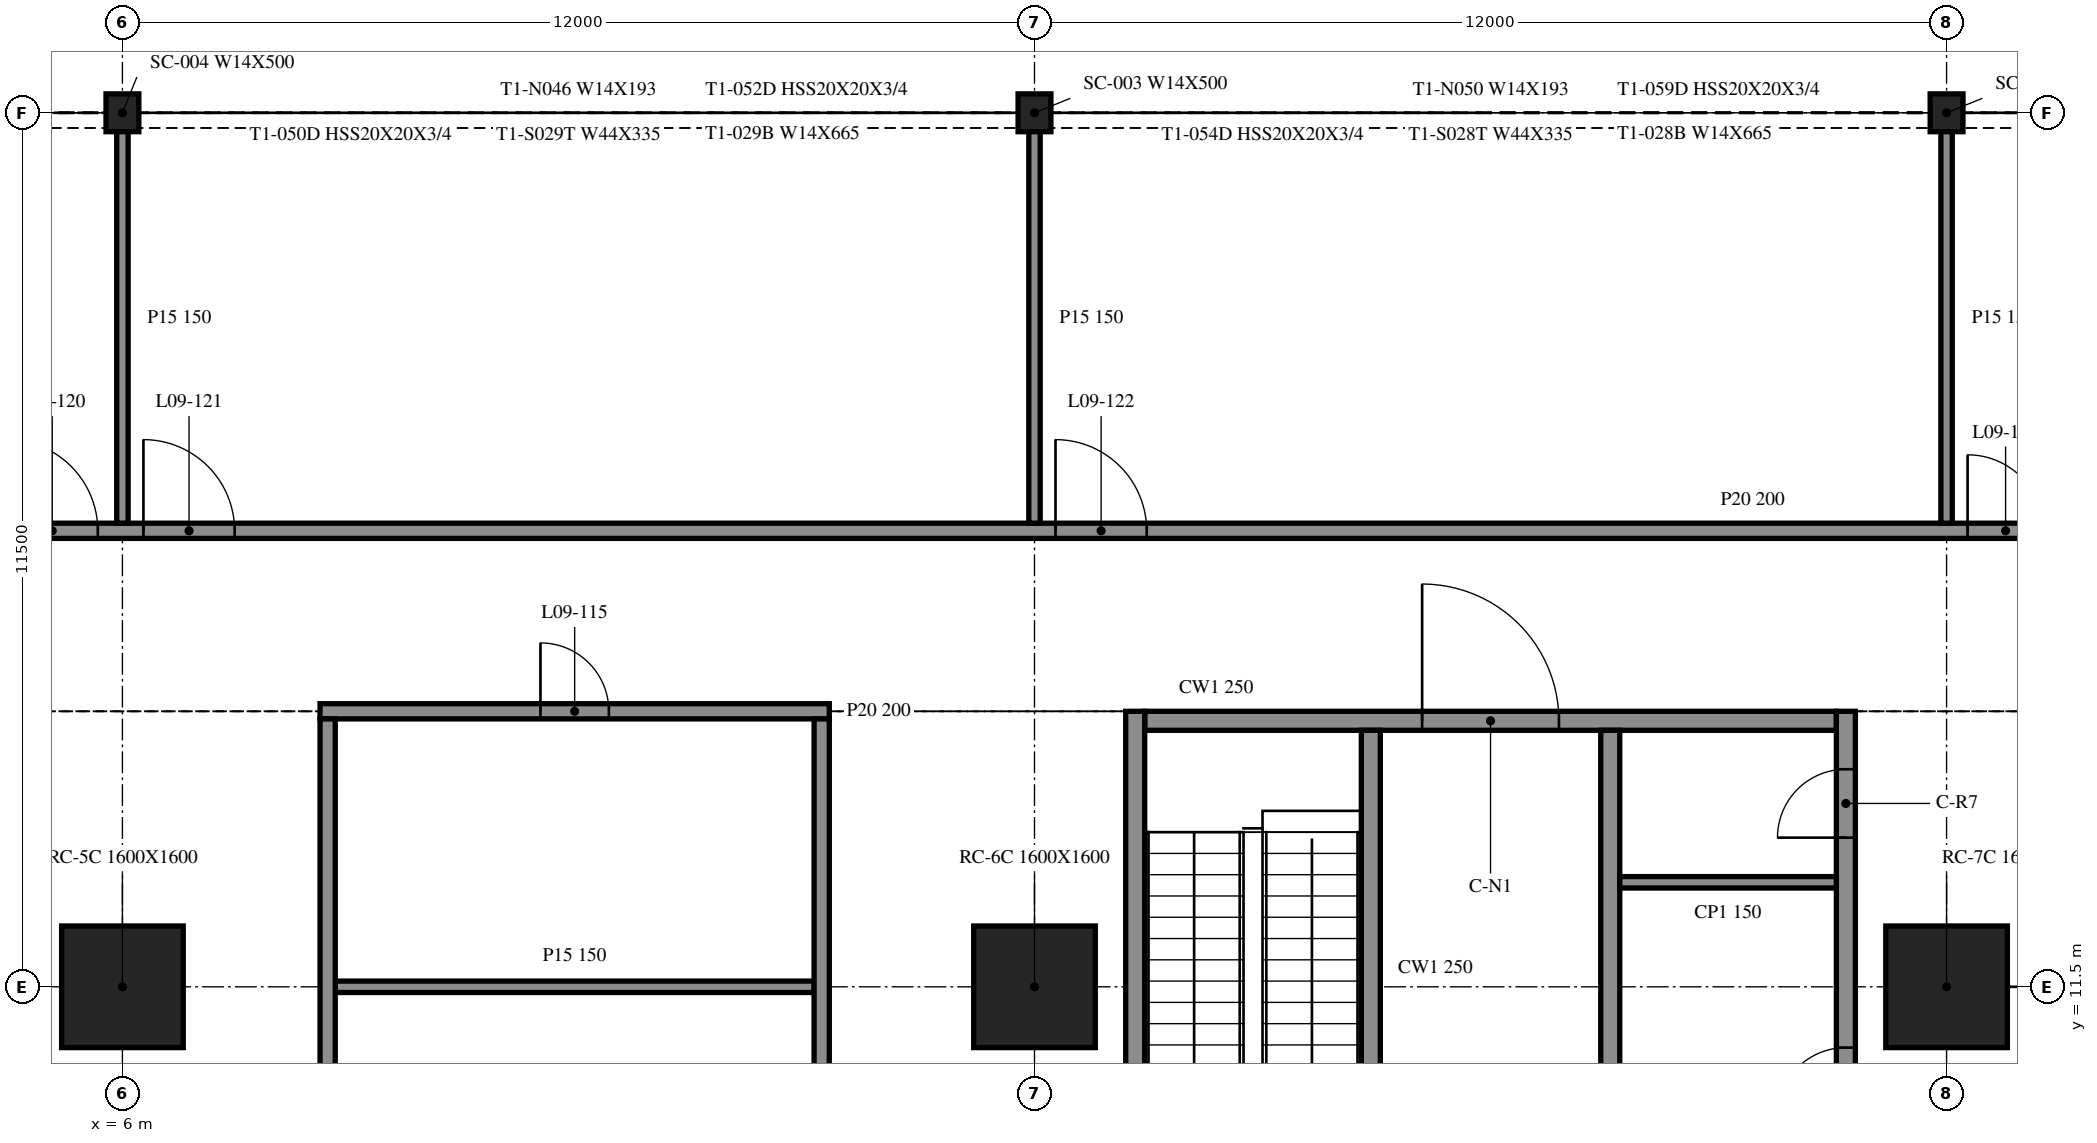
"""IFC4 building model, lengths in metres.
Left out: names, types, materials, properties, quantities, classifications, styles, units other than length and angle.
Written with IfcOpenShell. Run it as: python <this file> out.ifc"""

import sys

from ifc_helpers import new_model, si_unit, direction, frame, frame_2d, origin, origin_2d, place, context, subcontext, project, spatial, rectangle, i_section, extrude, element, fill, save


model = new_model("IFC4")
c1 = context("Model", 3, precision=1e-05, world=origin(), true_north=direction((0.0, 1.0)))
c2 = subcontext(c1, "Body", "Model", "MODEL_VIEW")
j1 = project(units=[si_unit("LENGTHUNIT", "METRE"), si_unit("PLANEANGLEUNIT", "RADIAN")], contexts=[c1])
p1 = place(None, origin())
s1 = spatial("IfcSite", under=j1, at=p1, CompositionType="ELEMENT")
p2 = place(p1, origin())
s2 = spatial("IfcBuilding", under=s1, at=p2, CompositionType="ELEMENT")
p3 = place(p2, frame((0.0, 0.0, 41.6)))
s3 = spatial("IfcBuildingStorey", under=s2, at=p3, CompositionType="ELEMENT", Elevation=41.6)
for number, where, z_axis, x_axis in (
    (1, (6.0, 11.5, -0.55), (0.0, 0.0, 1.0), (1.0, 0.0, 0.0)),
    (2, (18.0, 11.5, -0.55), (0.0, 0.0, 1.0), (1.0, 0.0, 0.0)),
    (3, (30.0, 11.5, -0.55), (0.0, 0.0, 1.0), (1.0, 0.0, 0.0)),
):
    element("IfcColumn", number, at=place(p3, frame(where, z_axis=z_axis, x_axis=x_axis)), inside=s3, PredefinedType="COLUMN", context=c2, shape_type="SweptSolid", body=[
        extrude(rectangle(XDim=1.6, YDim=1.6, at=origin_2d()), origin(), (0.0, 0.0, 1.0), 4.61),
    ])
for number, where, z_axis, x_axis in (
    (4, (30.0, 23.0, -0.55), (0.0, 0.0, 1.0), (1.0, 0.0, 0.0)),
    (5, (18.0, 23.0, -0.55), (0.0, 0.0, 1.0), (1.0, 0.0, 0.0)),
    (6, (6.0, 23.0, -0.55), (0.0, 0.0, 1.0), (1.0, 0.0, 0.0)),
):
    element("IfcColumn", number, at=place(p3, frame(where, z_axis=z_axis, x_axis=x_axis)), inside=s3, PredefinedType="COLUMN", context=c2, shape_type="SweptSolid", body=[
        extrude(i_section(OverallWidth=0.432, OverallDepth=0.498, WebThickness=0.056, FlangeThickness=0.089, at=origin_2d()), origin(), (0.0, 0.0, 1.0), 4.61),
    ])
p4 = place(p3, frame((19.325, 15.125, 0.0), z_axis=(0.0, 0.0, 1.0), x_axis=(0.0, -1.0, 0.0)))
e7 = element("IfcWall", 7, at=p4, inside=s3, PredefinedType="SOLIDWALL", context=c2, shape_type="SweptSolid", body=[
    extrude(rectangle(XDim=24.25, YDim=0.25, at=frame_2d((12.125, 0.0))), origin(), (0.0, 0.0, 1.0), 4.06),
])
p5 = place(p3, frame((28.675, -9.125, 0.0), z_axis=(0.0, 0.0, 1.0), x_axis=(0.0, 1.0, 0.0)))
e8 = element("IfcWall", 8, at=p5, inside=s3, PredefinedType="SOLIDWALL", context=c2, shape_type="SweptSolid", body=[
    extrude(rectangle(XDim=24.25, YDim=0.25, at=frame_2d((12.125, 0.0))), origin(), (0.0, 0.0, 1.0), 4.06),
])
p6 = place(p5, frame((13.075, 0.0, 0.0)))
e9 = element("IfcOpeningElement", 9, at=p6, cuts=e8, PredefinedType="OPENING", context=c2, shape_type="SweptSolid", body=[
    extrude(rectangle(XDim=0.9, YDim=2.1, at=frame_2d((0.45, 1.05))), frame((0.0, 0.135, 0.0), z_axis=(0.0, -1.0, 0.0), x_axis=(1.0, 0.0, 0.0)), (0.0, 0.0, 1.0), 0.27),
])
p7 = place(p5, frame((15.775, 0.0, 0.0)))
e10 = element("IfcOpeningElement", 10, at=p7, cuts=e8, PredefinedType="OPENING", context=c2, shape_type="SweptSolid", body=[
    extrude(rectangle(XDim=0.9, YDim=2.1, at=frame_2d((0.45, 1.05))), frame((0.0, 0.135, 0.0), z_axis=(0.0, -1.0, 0.0), x_axis=(1.0, 0.0, 0.0)), (0.0, 0.0, 1.0), 0.27),
])
p8 = place(p5, frame((18.925, 0.0, 0.0)))
e11 = element("IfcOpeningElement", 11, at=p8, cuts=e8, PredefinedType="OPENING", context=c2, shape_type="SweptSolid", body=[
    extrude(rectangle(XDim=0.9, YDim=2.1, at=frame_2d((0.45, 1.05))), frame((0.0, 0.135, 0.0), z_axis=(0.0, -1.0, 0.0), x_axis=(1.0, 0.0, 0.0)), (0.0, 0.0, 1.0), 0.27),
])
p9 = place(p5, frame((22.587, 0.0, 0.0)))
e12 = element("IfcOpeningElement", 12, at=p9, cuts=e8, PredefinedType="OPENING", context=c2, shape_type="SweptSolid", body=[
    extrude(rectangle(XDim=0.9, YDim=2.1, at=frame_2d((0.45, 1.05))), frame((0.0, 0.135, 0.0), z_axis=(0.0, -1.0, 0.0), x_axis=(1.0, 0.0, 0.0)), (0.0, 0.0, 1.0), 0.27),
])
p10 = place(p3, frame((19.45, 15.0, 0.0), z_axis=(0.0, 0.0, 1.0), x_axis=(1.0, 0.0, 0.0)))
e13 = element("IfcWall", 13, at=p10, inside=s3, PredefinedType="SOLIDWALL", context=c2, shape_type="SweptSolid", body=[
    extrude(rectangle(XDim=9.1, YDim=0.25, at=frame_2d((4.55, 0.0))), origin(), (0.0, 0.0, 1.0), 4.06),
])
p11 = place(p10, frame((3.65, 0.0, 0.0)))
e14 = element("IfcOpeningElement", 14, at=p11, cuts=e13, PredefinedType="OPENING", context=c2, shape_type="SweptSolid", body=[
    extrude(rectangle(XDim=1.8, YDim=2.1, at=frame_2d((0.9, 1.05))), frame((0.0, 0.135, 0.0), z_axis=(0.0, -1.0, 0.0), x_axis=(1.0, 0.0, 0.0)), (0.0, 0.0, 1.0), 0.27),
])
p12 = place(p3, frame((22.425, 14.875, 0.0), z_axis=(0.0, 0.0, 1.0), x_axis=(0.0, -1.0, 0.0)))
e15 = element("IfcWall", 15, at=p12, inside=s3, PredefinedType="SOLIDWALL", context=c2, shape_type="SweptSolid", body=[
    extrude(rectangle(XDim=6.25, YDim=0.25, at=frame_2d((3.125, 0.0))), origin(), (0.0, 0.0, 1.0), 4.06),
])
p13 = place(p12, frame((4.85, 0.0, 0.0)))
e16 = element("IfcOpeningElement", 16, at=p13, cuts=e15, PredefinedType="OPENING", context=c2, shape_type="SweptSolid", body=[
    extrude(rectangle(XDim=1.0, YDim=2.1, at=frame_2d((0.5, 1.05))), frame((0.0, 0.135, 0.0), z_axis=(0.0, -1.0, 0.0), x_axis=(1.0, 0.0, 0.0)), (0.0, 0.0, 1.0), 0.27),
])
p14 = place(p3, frame((25.575, 14.875, 0.0), z_axis=(0.0, 0.0, 1.0), x_axis=(0.0, -1.0, 0.0)))
e17 = element("IfcWall", 17, at=p14, inside=s3, PredefinedType="SOLIDWALL", context=c2, shape_type="SweptSolid", body=[
    extrude(rectangle(XDim=17.5, YDim=0.25, at=frame_2d((8.75, 0.0))), origin(), (0.0, 0.0, 1.0), 4.06),
])
p15 = place(p14, frame((15.45, 0.0, 0.0)))
e18 = element("IfcOpeningElement", 18, at=p15, cuts=e17, PredefinedType="OPENING", context=c2, shape_type="SweptSolid", body=[
    extrude(rectangle(XDim=1.1, YDim=2.1, at=frame_2d((0.55, 1.05))), frame((0.0, 0.135, 0.0), z_axis=(0.0, -1.0, 0.0), x_axis=(1.0, 0.0, 0.0)), (0.0, 0.0, 1.0), 0.27),
])
p16 = place(p14, frame((12.8, 0.0, 0.0)))
e19 = element("IfcOpeningElement", 19, at=p16, cuts=e17, PredefinedType="OPENING", context=c2, shape_type="SweptSolid", body=[
    extrude(rectangle(XDim=0.9, YDim=2.1, at=frame_2d((0.45, 1.05))), frame((0.0, 0.135, 0.0), z_axis=(0.0, -1.0, 0.0), x_axis=(1.0, 0.0, 0.0)), (0.0, 0.0, 1.0), 0.27),
])
p17 = place(p3, frame((25.7, 12.875, 0.0), z_axis=(0.0, 0.0, 1.0), x_axis=(1.0, 0.0, 0.0)))
e20 = element("IfcWall", 20, at=p17, inside=s3, PredefinedType="PARTITIONING", context=c2, shape_type="SweptSolid", body=[
    extrude(rectangle(XDim=2.85, YDim=0.15, at=frame_2d((1.425, 0.0))), origin(), (0.0, 0.0, 1.0), 4.06),
])
p18 = place(p3, frame((8.8, 11.5, 0.0), z_axis=(0.0, 0.0, 1.0), x_axis=(1.0, 0.0, 0.0)))
e21 = element("IfcWall", 21, at=p18, inside=s3, PredefinedType="PARTITIONING", context=c2, shape_type="SweptSolid", body=[
    extrude(rectangle(XDim=6.3, YDim=0.15, at=frame_2d((3.15, 0.0))), origin(), (0.0, 0.0, 1.0), 4.06),
])
p19 = place(p3, frame((8.6, 15.125, 0.0), z_axis=(0.0, 0.0, 1.0), x_axis=(1.0, 0.0, 0.0)))
e22 = element("IfcWall", 22, at=p19, inside=s3, PredefinedType="PARTITIONING", context=c2, shape_type="SweptSolid", body=[
    extrude(rectangle(XDim=6.7, YDim=0.2, at=frame_2d((3.35, 0.0))), origin(), (0.0, 0.0, 1.0), 4.06),
])
p20 = place(p19, frame((2.9, 0.0, 0.0)))
e23 = element("IfcOpeningElement", 23, at=p20, cuts=e22, PredefinedType="OPENING", context=c2, shape_type="SweptSolid", body=[
    extrude(rectangle(XDim=0.9, YDim=2.1, at=frame_2d((0.45, 1.05))), frame((0.0, 0.11, 0.0), z_axis=(0.0, -1.0, 0.0), x_axis=(1.0, 0.0, 0.0)), (0.0, 0.0, 1.0), 0.22),
])
p21 = place(p3, frame((-40.624, 17.5, 0.0), z_axis=(0.0, 0.0, 1.0), x_axis=(1.0, 0.0, 0.0)))
e24 = element("IfcWall", 24, at=p21, inside=s3, PredefinedType="PARTITIONING", context=c2, shape_type="SweptSolid", body=[
    extrude(rectangle(XDim=94.524, YDim=0.2, at=frame_2d((47.262, 0.0))), origin(), (0.0, 0.0, 1.0), 4.06),
])
p22 = place(p21, frame((9.3, 0.0, 0.0)))
e25 = element("IfcOpeningElement", 25, at=p22, cuts=e24, PredefinedType="OPENING", context=c2, shape_type="SweptSolid", body=[
    extrude(rectangle(XDim=1.0, YDim=2.1, at=frame_2d((0.5, 1.05))), frame((0.0, 0.11, 0.0), z_axis=(0.0, -1.0, 0.0), x_axis=(1.0, 0.0, 0.0)), (0.0, 0.0, 1.0), 0.22),
])
p23 = place(p21, frame((21.3, 0.0, 0.0)))
e26 = element("IfcOpeningElement", 26, at=p23, cuts=e24, PredefinedType="OPENING", context=c2, shape_type="SweptSolid", body=[
    extrude(rectangle(XDim=1.0, YDim=2.1, at=frame_2d((0.5, 1.05))), frame((0.0, 0.11, 0.0), z_axis=(0.0, -1.0, 0.0), x_axis=(1.0, 0.0, 0.0)), (0.0, 0.0, 1.0), 0.22),
])
p24 = place(p21, frame((33.5, 0.0, 0.0)))
e27 = element("IfcOpeningElement", 27, at=p24, cuts=e24, PredefinedType="OPENING", context=c2, shape_type="SweptSolid", body=[
    extrude(rectangle(XDim=0.9, YDim=2.1, at=frame_2d((0.45, 1.05))), frame((0.0, 0.11, 0.0), z_axis=(0.0, -1.0, 0.0), x_axis=(1.0, 0.0, 0.0)), (0.0, 0.0, 1.0), 0.22),
])
p25 = place(p21, frame((45.1, 0.0, 0.0)))
e28 = element("IfcOpeningElement", 28, at=p25, cuts=e24, PredefinedType="OPENING", context=c2, shape_type="SweptSolid", body=[
    extrude(rectangle(XDim=1.2, YDim=2.1, at=frame_2d((0.6, 1.05))), frame((0.0, 0.11, 0.0), z_axis=(0.0, -1.0, 0.0), x_axis=(1.0, 0.0, 0.0)), (0.0, 0.0, 1.0), 0.22),
])
p26 = place(p21, frame((46.9, 0.0, 0.0)))
e29 = element("IfcOpeningElement", 29, at=p26, cuts=e24, PredefinedType="OPENING", context=c2, shape_type="SweptSolid", body=[
    extrude(rectangle(XDim=1.2, YDim=2.1, at=frame_2d((0.6, 1.05))), frame((0.0, 0.11, 0.0), z_axis=(0.0, -1.0, 0.0), x_axis=(1.0, 0.0, 0.0)), (0.0, 0.0, 1.0), 0.22),
])
p27 = place(p21, frame((58.9, 0.0, 0.0)))
e30 = element("IfcOpeningElement", 30, at=p27, cuts=e24, PredefinedType="OPENING", context=c2, shape_type="SweptSolid", body=[
    extrude(rectangle(XDim=1.2, YDim=2.1, at=frame_2d((0.6, 1.05))), frame((0.0, 0.11, 0.0), z_axis=(0.0, -1.0, 0.0), x_axis=(1.0, 0.0, 0.0)), (0.0, 0.0, 1.0), 0.22),
])
p28 = place(p21, frame((70.9, 0.0, 0.0)))
e31 = element("IfcOpeningElement", 31, at=p28, cuts=e24, PredefinedType="OPENING", context=c2, shape_type="SweptSolid", body=[
    extrude(rectangle(XDim=1.0, YDim=2.1, at=frame_2d((0.5, 1.05))), frame((0.0, 0.11, 0.0), z_axis=(0.0, -1.0, 0.0), x_axis=(1.0, 0.0, 0.0)), (0.0, 0.0, 1.0), 0.22),
])
p29 = place(p21, frame((82.9, 0.0, 0.0)))
e32 = element("IfcOpeningElement", 32, at=p29, cuts=e24, PredefinedType="OPENING", context=c2, shape_type="SweptSolid", body=[
    extrude(rectangle(XDim=1.0, YDim=2.1, at=frame_2d((0.5, 1.05))), frame((0.0, 0.11, 0.0), z_axis=(0.0, -1.0, 0.0), x_axis=(1.0, 0.0, 0.0)), (0.0, 0.0, 1.0), 0.22),
])
p30 = place(p3, frame((6.0, 17.6, 0.0), z_axis=(0.0, 0.0, 1.0), x_axis=(0.0, 1.0, 0.0)))
e33 = element("IfcWall", 33, at=p30, inside=s3, PredefinedType="PARTITIONING", context=c2, shape_type="SweptSolid", body=[
    extrude(rectangle(XDim=5.4, YDim=0.15, at=frame_2d((2.7, 0.0))), origin(), (0.0, 0.0, 1.0), 4.06),
])
p31 = place(p3, frame((8.7, -9.025, 0.0), z_axis=(0.0, 0.0, 1.0), x_axis=(0.0, 1.0, 0.0)))
e34 = element("IfcWall", 34, at=p31, inside=s3, PredefinedType="PARTITIONING", context=c2, shape_type="SweptSolid", body=[
    extrude(rectangle(XDim=24.05, YDim=0.2, at=frame_2d((12.025, 0.0))), origin(), (0.0, 0.0, 1.0), 4.06),
])
p32 = place(p31, frame((11.5, 0.0, 0.0)))
e35 = element("IfcOpeningElement", 35, at=p32, cuts=e34, PredefinedType="OPENING", context=c2, shape_type="SweptSolid", body=[
    extrude(rectangle(XDim=1.0, YDim=2.1, at=frame_2d((0.5, 1.05))), frame((0.0, 0.11, 0.0), z_axis=(0.0, -1.0, 0.0), x_axis=(1.0, 0.0, 0.0)), (0.0, 0.0, 1.0), 0.22),
])
p33 = place(p3, frame((15.2, -9.025, 0.0), z_axis=(0.0, 0.0, 1.0), x_axis=(0.0, 1.0, 0.0)))
e36 = element("IfcWall", 36, at=p33, inside=s3, PredefinedType="PARTITIONING", context=c2, shape_type="SweptSolid", body=[
    extrude(rectangle(XDim=24.05, YDim=0.2, at=frame_2d((12.025, 0.0))), origin(), (0.0, 0.0, 1.0), 4.06),
])
for number, where, z_axis, x_axis in (
    (37, (18.0, 17.6, 0.0), (0.0, 0.0, 1.0), (0.0, 1.0, 0.0)),
    (38, (30.0, 17.6, 0.0), (0.0, 0.0, 1.0), (0.0, 1.0, 0.0)),
):
    element("IfcWall", number, at=place(p3, frame(where, z_axis=z_axis, x_axis=x_axis)), inside=s3, PredefinedType="PARTITIONING", context=c2, shape_type="SweptSolid", body=[
        extrude(rectangle(XDim=5.4, YDim=0.15, at=frame_2d((2.7, 0.0))), origin(), (0.0, 0.0, 1.0), 4.06),
    ])
p34 = place(p11, origin())
e39 = element("IfcDoor", 39, at=p34, inside=s3, OperationType="DOUBLE_DOOR_SINGLE_SWING", PredefinedType="DOOR", context=c2, shape_type="SweptSolid", body=[
    extrude(rectangle(XDim=1.8, YDim=2.1, at=frame_2d((0.9, 1.05))), frame((0.0, 0.025, 0.0), z_axis=(0.0, -1.0, 0.0), x_axis=(1.0, 0.0, 0.0)), (0.0, 0.0, 1.0), 0.05),
])
fill(e14, e39)
p35 = place(p8, origin())
e40 = element("IfcDoor", 40, at=p35, inside=s3, OperationType="SINGLE_SWING_RIGHT", PredefinedType="DOOR", context=c2, shape_type="SweptSolid", body=[
    extrude(rectangle(XDim=0.9, YDim=2.1, at=frame_2d((0.45, 1.05))), frame((0.0, 0.025, 0.0), z_axis=(0.0, -1.0, 0.0), x_axis=(1.0, 0.0, 0.0)), (0.0, 0.0, 1.0), 0.05),
])
fill(e11, e40)
p36 = place(p9, origin())
e41 = element("IfcDoor", 41, at=p36, inside=s3, OperationType="SINGLE_SWING_LEFT", PredefinedType="DOOR", context=c2, shape_type="SweptSolid", body=[
    extrude(rectangle(XDim=0.9, YDim=2.1, at=frame_2d((0.45, 1.05))), frame((0.0, 0.025, 0.0), z_axis=(0.0, -1.0, 0.0), x_axis=(1.0, 0.0, 0.0)), (0.0, 0.0, 1.0), 0.05),
])
fill(e12, e41)
p37 = place(p20, origin())
e42 = element("IfcDoor", 42, at=p37, inside=s3, OperationType="SINGLE_SWING_RIGHT", PredefinedType="DOOR", context=c2, shape_type="SweptSolid", body=[
    extrude(rectangle(XDim=0.9, YDim=2.1, at=frame_2d((0.45, 1.05))), frame((0.0, 0.025, 0.0), z_axis=(0.0, -1.0, 0.0), x_axis=(1.0, 0.0, 0.0)), (0.0, 0.0, 1.0), 0.05),
])
fill(e23, e42)
p38 = place(p25, origin())
e43 = element("IfcDoor", 43, at=p38, inside=s3, OperationType="SINGLE_SWING_LEFT", PredefinedType="DOOR", context=c2, shape_type="SweptSolid", body=[
    extrude(rectangle(XDim=1.2, YDim=2.1, at=frame_2d((0.6, 1.05))), frame((0.0, 0.025, 0.0), z_axis=(0.0, -1.0, 0.0), x_axis=(1.0, 0.0, 0.0)), (0.0, 0.0, 1.0), 0.05),
])
fill(e28, e43)
p39 = place(p26, origin())
e44 = element("IfcDoor", 44, at=p39, inside=s3, OperationType="SINGLE_SWING_RIGHT", PredefinedType="DOOR", context=c2, shape_type="SweptSolid", body=[
    extrude(rectangle(XDim=1.2, YDim=2.1, at=frame_2d((0.6, 1.05))), frame((0.0, 0.025, 0.0), z_axis=(0.0, -1.0, 0.0), x_axis=(1.0, 0.0, 0.0)), (0.0, 0.0, 1.0), 0.05),
])
fill(e29, e44)
p40 = place(p27, origin())
e45 = element("IfcDoor", 45, at=p40, inside=s3, OperationType="SINGLE_SWING_RIGHT", PredefinedType="DOOR", context=c2, shape_type="SweptSolid", body=[
    extrude(rectangle(XDim=1.2, YDim=2.1, at=frame_2d((0.6, 1.05))), frame((0.0, 0.025, 0.0), z_axis=(0.0, -1.0, 0.0), x_axis=(1.0, 0.0, 0.0)), (0.0, 0.0, 1.0), 0.05),
])
fill(e30, e45)
p41 = place(p28, origin())
e46 = element("IfcDoor", 46, at=p41, inside=s3, OperationType="SINGLE_SWING_RIGHT", PredefinedType="DOOR", context=c2, shape_type="SweptSolid", body=[
    extrude(rectangle(XDim=1.0, YDim=2.1, at=frame_2d((0.5, 1.05))), frame((0.0, 0.025, 0.0), z_axis=(0.0, -1.0, 0.0), x_axis=(1.0, 0.0, 0.0)), (0.0, 0.0, 1.0), 0.05),
])
fill(e31, e46)
save(model, sys.argv[1])
